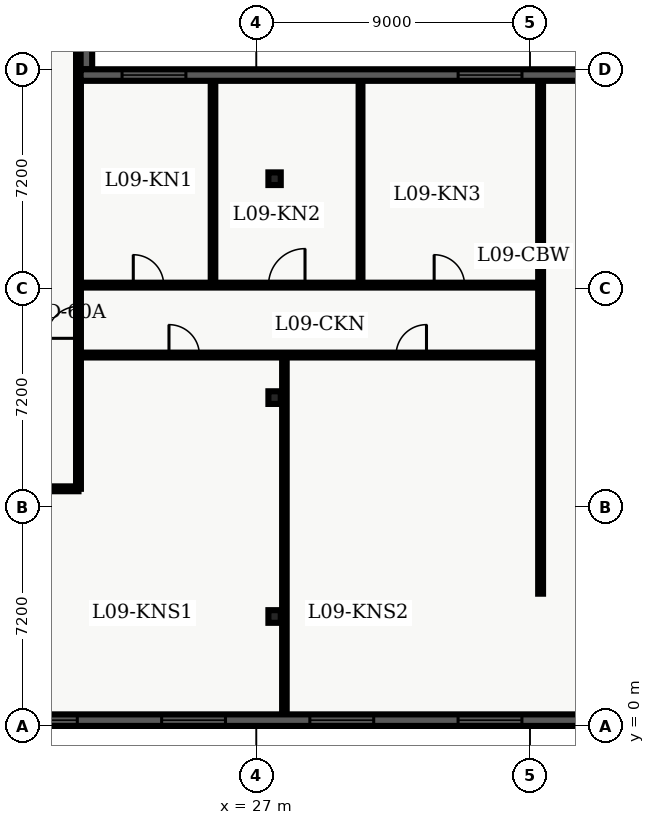
"""IFC4 building model, lengths in metres.
Left out: names, types, materials, properties, quantities, classifications, styles, units other than length and angle.
Written with IfcOpenShell. Run it as: python <this file> out.ifc"""

import sys

from ifc_helpers import new_model, entity, si_unit, converted_unit, direction, frame, origin_with_axes, origin_2d_with_axis, place, context, subcontext, project, spatial, polyline, rectangle, i_section, outline, extrude, element, fill, save


model = new_model("IFC4")
c1 = context("Model", 3, precision=1e-05, world=origin_with_axes(), true_north=direction((0.0, 1.0)))
c2 = subcontext(c1, "Body", "Model", "MODEL_VIEW")
j1 = project(units=[si_unit("LENGTHUNIT", "METRE"), converted_unit("PLANEANGLEUNIT", "DEGREE", entity("IfcPlaneAngleMeasure", 0.017), si_unit("PLANEANGLEUNIT", "RADIAN"), dimensions=[0, 0, 0, 0, 0, 0, 0])], contexts=[c1])
p1 = place(None, origin_with_axes())
s1 = spatial("IfcSite", under=j1, at=p1, CompositionType="ELEMENT")
p2 = place(p1, origin_with_axes())
s2 = spatial("IfcBuilding", under=s1, at=p2, CompositionType="ELEMENT")
p3 = place(p2, frame((0.0, 0.0, 40.5), z_axis=(0.0, 0.0, 1.0), x_axis=(1.0, 0.0, 0.0)))
s3 = spatial("IfcBuildingStorey", under=s2, at=p3, CompositionType="ELEMENT", Elevation=40.5)
for number, where, z_axis, x_axis in (
    (1, (27.6, 3.6, 0.0), (0.0, 0.0, 1.0), (1.0, 0.0, 0.0)),
    (2, (27.6, 10.8, 0.0), (0.0, 0.0, 1.0), (1.0, 0.0, 0.0)),
    (3, (27.6, 18.0, 0.0), (0.0, 0.0, 1.0), (1.0, 0.0, 0.0)),
):
    element("IfcColumn", number, at=place(p3, frame(where, z_axis=z_axis, x_axis=x_axis)), inside=s3, PredefinedType="COLUMN", context=c2, shape_type="SweptSolid", body=[
        extrude(i_section(OverallWidth=0.406, OverallDepth=0.416, WebThickness=0.03, FlangeThickness=0.048, FilletRadius=0.022, at=origin_2d_with_axis()), origin_with_axes(), (0.0, 0.0, 1.0), 3.9),
    ])
p4 = place(p3, frame((2.6, 7.8, 0.0), z_axis=(0.0, 0.0, 1.0), x_axis=(1.0, 0.0, 0.0)))
e4 = element("IfcWall", 4, at=p4, inside=s3, PredefinedType="PARTITIONING", context=c2, shape_type="SweptSolid", body=[
    extrude(outline(polyline([(0.0, -0.08), (18.55, -0.08), (18.55, 0.08), (0.0, 0.08), (0.0, -0.08)])), origin_with_axes(), (0.0, 0.0, 1.0), 2.7),
])
p5 = place(p4, frame((2.225, 0.0, 0.0), z_axis=(0.0, 0.0, 1.0), x_axis=(1.0, 0.0, 0.0)))
e5 = element("IfcOpeningElement", 5, at=p5, cuts=e4, PredefinedType="OPENING", context=c2, shape_type="SweptSolid", body=[
    extrude(rectangle(XDim=1.0, YDim=0.18, at=origin_2d_with_axis()), origin_with_axes(), (0.0, 0.0, 1.0), 2.15),
])
p6 = place(p4, frame((8.043, 0.0, 0.0), z_axis=(0.0, 0.0, 1.0), x_axis=(1.0, 0.0, 0.0)))
e6 = element("IfcOpeningElement", 6, at=p6, cuts=e4, PredefinedType="OPENING", context=c2, shape_type="SweptSolid", body=[
    extrude(rectangle(XDim=1.0, YDim=0.18, at=origin_2d_with_axis()), origin_with_axes(), (0.0, 0.0, 1.0), 2.15),
])
p7 = place(p4, frame((14.784, 0.0, 0.0), z_axis=(0.0, 0.0, 1.0), x_axis=(1.0, 0.0, 0.0)))
e7 = element("IfcOpeningElement", 7, at=p7, cuts=e4, PredefinedType="OPENING", context=c2, shape_type="SweptSolid", body=[
    extrude(rectangle(XDim=1.0, YDim=0.18, at=origin_2d_with_axis()), origin_with_axes(), (0.0, 0.0, 1.0), 2.15),
])
p8 = place(p3, frame((21.15, 7.8, 0.0), z_axis=(0.0, 0.0, 1.0), x_axis=(0.0, 1.0, 0.0)))
e8 = element("IfcWall", 8, at=p8, inside=s3, PredefinedType="PARTITIONING", context=c2, shape_type="SweptSolid", body=[
    extrude(outline(polyline([(0.0, -0.08), (32.7, -0.08), (32.7, 0.08), (0.0, 0.08), (0.0, -0.08)])), origin_with_axes(), (0.0, 0.0, 1.0), 2.7),
])
p9 = place(p8, frame((5.475, 0.0, 0.0), z_axis=(0.0, 0.0, 1.0), x_axis=(1.0, 0.0, 0.0)))
e9 = element("IfcOpeningElement", 9, at=p9, cuts=e8, PredefinedType="OPENING", context=c2, shape_type="SweptSolid", body=[
    extrude(rectangle(XDim=1.05, YDim=0.18, at=origin_2d_with_axis()), origin_with_axes(), (0.0, 0.0, 1.0), 2.15),
])
p10 = place(p3, frame((21.15, 12.2, 0.0), z_axis=(0.0, 0.0, 1.0), x_axis=(1.0, 0.0, 0.0)))
e10 = element("IfcWall", 10, at=p10, inside=s3, PredefinedType="PARTITIONING", context=c2, shape_type="SweptSolid", body=[
    extrude(outline(polyline([(0.0, -0.08), (15.2, -0.08), (15.2, 0.08), (0.0, 0.08), (0.0, -0.08)])), origin_with_axes(), (0.0, 0.0, 1.0), 2.7),
])
p11 = place(p10, frame((3.477, 0.0, 0.0), z_axis=(0.0, 0.0, 1.0), x_axis=(1.0, 0.0, 0.0)))
e11 = element("IfcOpeningElement", 11, at=p11, cuts=e10, PredefinedType="OPENING", context=c2, shape_type="SweptSolid", body=[
    extrude(rectangle(XDim=1.0, YDim=0.18, at=origin_2d_with_axis()), origin_with_axes(), (0.0, 0.0, 1.0), 2.15),
])
p12 = place(p10, frame((10.947, 0.0, 0.0), z_axis=(0.0, 0.0, 1.0), x_axis=(1.0, 0.0, 0.0)))
e12 = element("IfcOpeningElement", 12, at=p12, cuts=e10, PredefinedType="OPENING", context=c2, shape_type="SweptSolid", body=[
    extrude(rectangle(XDim=1.0, YDim=0.18, at=origin_2d_with_axis()), origin_with_axes(), (0.0, 0.0, 1.0), 2.15),
])
p13 = place(p3, frame((21.15, 14.5, 0.0), z_axis=(0.0, 0.0, 1.0), x_axis=(1.0, 0.0, 0.0)))
e13 = element("IfcWall", 13, at=p13, inside=s3, PredefinedType="PARTITIONING", context=c2, shape_type="SweptSolid", body=[
    extrude(outline(polyline([(0.0, -0.08), (15.2, -0.08), (15.2, 0.08), (0.0, 0.08), (0.0, -0.08)])), origin_with_axes(), (0.0, 0.0, 1.0), 2.7),
])
p14 = place(p13, frame((2.303, 0.0, 0.0), z_axis=(0.0, 0.0, 1.0), x_axis=(1.0, 0.0, 0.0)))
e14 = element("IfcOpeningElement", 14, at=p14, cuts=e13, PredefinedType="OPENING", context=c2, shape_type="SweptSolid", body=[
    extrude(rectangle(XDim=1.0, YDim=0.18, at=origin_2d_with_axis()), origin_with_axes(), (0.0, 0.0, 1.0), 2.15),
])
p15 = place(p13, frame((6.851, 0.0, 0.0), z_axis=(0.0, 0.0, 1.0), x_axis=(1.0, 0.0, 0.0)))
e15 = element("IfcOpeningElement", 15, at=p15, cuts=e13, PredefinedType="OPENING", context=c2, shape_type="SweptSolid", body=[
    extrude(rectangle(XDim=1.2, YDim=0.18, at=origin_2d_with_axis()), origin_with_axes(), (0.0, 0.0, 1.0), 2.2),
])
p16 = place(p13, frame((12.198, 0.0, 0.0), z_axis=(0.0, 0.0, 1.0), x_axis=(1.0, 0.0, 0.0)))
e16 = element("IfcOpeningElement", 16, at=p16, cuts=e13, PredefinedType="OPENING", context=c2, shape_type="SweptSolid", body=[
    extrude(rectangle(XDim=1.0, YDim=0.18, at=origin_2d_with_axis()), origin_with_axes(), (0.0, 0.0, 1.0), 2.15),
])
p17 = place(p3, frame((36.35, 4.35, 0.0), z_axis=(0.0, 0.0, 1.0), x_axis=(0.0, 1.0, 0.0)))
e17 = element("IfcWall", 17, at=p17, inside=s3, PredefinedType="PARTITIONING", context=c2, shape_type="SweptSolid", body=[
    extrude(outline(polyline([(0.0, -0.08), (16.95, -0.08), (16.95, 0.08), (0.0, 0.08), (0.0, -0.08)])), origin_with_axes(), (0.0, 0.0, 1.0), 2.7),
])
p18 = place(p3, frame((27.923, 0.36, 0.0), z_axis=(0.0, 0.0, 1.0), x_axis=(0.0, 1.0, 0.0)))
e18 = element("IfcWall", 18, at=p18, inside=s3, PredefinedType="PARTITIONING", context=c2, shape_type="SweptSolid", body=[
    extrude(outline(polyline([(0.0, -0.075), (11.72, -0.075), (11.72, 0.075), (0.0, 0.075), (0.0, -0.075)])), origin_with_axes(), (0.0, 0.0, 1.0), 2.7),
])
p19 = place(p3, frame((25.575, 14.62, 0.0), z_axis=(0.0, 0.0, 1.0), x_axis=(0.0, 1.0, 0.0)))
e19 = element("IfcWall", 19, at=p19, inside=s3, PredefinedType="PARTITIONING", context=c2, shape_type="SweptSolid", body=[
    extrude(outline(polyline([(0.0, -0.075), (6.605, -0.075), (6.605, 0.075), (0.0, 0.075), (0.0, -0.075)])), origin_with_axes(), (0.0, 0.0, 1.0), 2.7),
])
p20 = place(p3, frame((30.427, 14.62, 0.0), z_axis=(0.0, 0.0, 1.0), x_axis=(0.0, 1.0, 0.0)))
e20 = element("IfcWall", 20, at=p20, inside=s3, PredefinedType="PARTITIONING", context=c2, shape_type="SweptSolid", body=[
    extrude(outline(polyline([(0.0, -0.062), (6.605, -0.062), (6.605, 0.062), (0.0, 0.062), (0.0, -0.062)])), origin_with_axes(), (0.0, 0.0, 1.0), 2.7),
])
p21 = place(p3, frame((57.22, 0.19, 0.0), z_axis=(0.0, 0.0, 1.0), x_axis=(-1.0, 0.0, 0.0)))
e21 = element("IfcWall", 21, at=p21, inside=s3, PredefinedType="SOLIDWALL", context=c2, shape_type="SweptSolid", body=[
    extrude(outline(polyline([(0.0, -0.19), (54.82, -0.19), (54.82, 0.19), (0.0, 0.19), (0.0, -0.19)])), origin_with_axes(), (0.0, 0.0, 1.0), 3.66),
])
p22 = place(p21, frame((3.037, 0.0, 0.45), z_axis=(0.0, 0.0, 1.0), x_axis=(1.0, 0.0, 0.0)))
e22 = element("IfcOpeningElement", 22, at=p22, cuts=e21, PredefinedType="OPENING", context=c2, shape_type="SweptSolid", body=[
    extrude(rectangle(XDim=2.1, YDim=0.4, at=origin_2d_with_axis()), origin_with_axes(), (0.0, 0.0, 1.0), 2.2),
])
p23 = place(p21, frame((7.912, 0.0, 0.45), z_axis=(0.0, 0.0, 1.0), x_axis=(1.0, 0.0, 0.0)))
e23 = element("IfcOpeningElement", 23, at=p23, cuts=e21, PredefinedType="OPENING", context=c2, shape_type="SweptSolid", body=[
    extrude(rectangle(XDim=2.1, YDim=0.4, at=origin_2d_with_axis()), origin_with_axes(), (0.0, 0.0, 1.0), 2.2),
])
p24 = place(p21, frame((12.786, 0.0, 0.45), z_axis=(0.0, 0.0, 1.0), x_axis=(1.0, 0.0, 0.0)))
e24 = element("IfcOpeningElement", 24, at=p24, cuts=e21, PredefinedType="OPENING", context=c2, shape_type="SweptSolid", body=[
    extrude(rectangle(XDim=2.1, YDim=0.4, at=origin_2d_with_axis()), origin_with_axes(), (0.0, 0.0, 1.0), 2.2),
])
p25 = place(p21, frame((17.661, 0.0, 0.45), z_axis=(0.0, 0.0, 1.0), x_axis=(1.0, 0.0, 0.0)))
e25 = element("IfcOpeningElement", 25, at=p25, cuts=e21, PredefinedType="OPENING", context=c2, shape_type="SweptSolid", body=[
    extrude(rectangle(XDim=2.1, YDim=0.4, at=origin_2d_with_axis()), origin_with_axes(), (0.0, 0.0, 1.0), 2.2),
])
p26 = place(p21, frame((22.535, 0.0, 0.45), z_axis=(0.0, 0.0, 1.0), x_axis=(1.0, 0.0, 0.0)))
e26 = element("IfcOpeningElement", 26, at=p26, cuts=e21, PredefinedType="OPENING", context=c2, shape_type="SweptSolid", body=[
    extrude(rectangle(XDim=2.1, YDim=0.4, at=origin_2d_with_axis()), origin_with_axes(), (0.0, 0.0, 1.0), 2.2),
])
p27 = place(p21, frame((27.41, 0.0, 0.45), z_axis=(0.0, 0.0, 1.0), x_axis=(1.0, 0.0, 0.0)))
e27 = element("IfcOpeningElement", 27, at=p27, cuts=e21, PredefinedType="OPENING", context=c2, shape_type="SweptSolid", body=[
    extrude(rectangle(XDim=2.1, YDim=0.4, at=origin_2d_with_axis()), origin_with_axes(), (0.0, 0.0, 1.0), 2.2),
])
p28 = place(p21, frame((32.285, 0.0, 0.45), z_axis=(0.0, 0.0, 1.0), x_axis=(1.0, 0.0, 0.0)))
e28 = element("IfcOpeningElement", 28, at=p28, cuts=e21, PredefinedType="OPENING", context=c2, shape_type="SweptSolid", body=[
    extrude(rectangle(XDim=2.1, YDim=0.4, at=origin_2d_with_axis()), origin_with_axes(), (0.0, 0.0, 1.0), 2.2),
])
p29 = place(p21, frame((37.159, 0.0, 0.45), z_axis=(0.0, 0.0, 1.0), x_axis=(1.0, 0.0, 0.0)))
e29 = element("IfcOpeningElement", 29, at=p29, cuts=e21, PredefinedType="OPENING", context=c2, shape_type="SweptSolid", body=[
    extrude(rectangle(XDim=2.1, YDim=0.4, at=origin_2d_with_axis()), origin_with_axes(), (0.0, 0.0, 1.0), 2.2),
])
p30 = place(p21, frame((41.584, 0.0, 0.45), z_axis=(0.0, 0.0, 1.0), x_axis=(1.0, 0.0, 0.0)))
e30 = element("IfcOpeningElement", 30, at=p30, cuts=e21, PredefinedType="OPENING", context=c2, shape_type="SweptSolid", body=[
    extrude(rectangle(XDim=2.1, YDim=0.4, at=origin_2d_with_axis()), origin_with_axes(), (0.0, 0.0, 1.0), 2.2),
])
p31 = place(p21, frame((46.908, 0.0, 0.45), z_axis=(0.0, 0.0, 1.0), x_axis=(1.0, 0.0, 0.0)))
e31 = element("IfcOpeningElement", 31, at=p31, cuts=e21, PredefinedType="OPENING", context=c2, shape_type="SweptSolid", body=[
    extrude(rectangle(XDim=2.1, YDim=0.4, at=origin_2d_with_axis()), origin_with_axes(), (0.0, 0.0, 1.0), 2.2),
])
p32 = place(p21, frame((51.783, 0.0, 0.45), z_axis=(0.0, 0.0, 1.0), x_axis=(1.0, 0.0, 0.0)))
e32 = element("IfcOpeningElement", 32, at=p32, cuts=e21, PredefinedType="OPENING", context=c2, shape_type="SweptSolid", body=[
    extrude(rectangle(XDim=2.1, YDim=0.4, at=origin_2d_with_axis()), origin_with_axes(), (0.0, 0.0, 1.0), 2.2),
])
p33 = place(p3, frame((21.41, 45.82, 0.0), z_axis=(0.0, 0.0, 1.0), x_axis=(0.0, -1.0, 0.0)))
e33 = element("IfcWall", 33, at=p33, inside=s3, PredefinedType="SOLIDWALL", context=c2, shape_type="SweptSolid", body=[
    extrude(outline(polyline([(0.0, -0.19), (24.22, -0.19), (24.22, 0.19), (0.0, 0.19), (0.0, -0.19)])), origin_with_axes(), (0.0, 0.0, 1.0), 3.66),
])
p34 = place(p33, frame((2.902, 0.0, 0.45), z_axis=(0.0, 0.0, 1.0), x_axis=(1.0, 0.0, 0.0)))
e34 = element("IfcOpeningElement", 34, at=p34, cuts=e33, PredefinedType="OPENING", context=c2, shape_type="SweptSolid", body=[
    extrude(rectangle(XDim=2.1, YDim=0.4, at=origin_2d_with_axis()), origin_with_axes(), (0.0, 0.0, 1.0), 2.2),
])
p35 = place(p3, frame((21.22, 21.41, 0.0), z_axis=(0.0, 0.0, 1.0), x_axis=(1.0, 0.0, 0.0)))
e35 = element("IfcWall", 35, at=p35, inside=s3, PredefinedType="SOLIDWALL", context=c2, shape_type="SweptSolid", body=[
    extrude(outline(polyline([(0.0, -0.19), (17.18, -0.19), (17.18, 0.19), (0.0, 0.19), (0.0, -0.19)])), origin_with_axes(), (0.0, 0.0, 1.0), 3.66),
])
p36 = place(p35, frame((2.413, 0.0, 0.45), z_axis=(0.0, 0.0, 1.0), x_axis=(1.0, 0.0, 0.0)))
e36 = element("IfcOpeningElement", 36, at=p36, cuts=e35, PredefinedType="OPENING", context=c2, shape_type="SweptSolid", body=[
    extrude(rectangle(XDim=2.1, YDim=0.4, at=origin_2d_with_axis()), origin_with_axes(), (0.0, 0.0, 1.0), 2.2),
])
p37 = place(p35, frame((13.467, 0.0, 0.45), z_axis=(0.0, 0.0, 1.0), x_axis=(1.0, 0.0, 0.0)))
e37 = element("IfcOpeningElement", 37, at=p37, cuts=e35, PredefinedType="OPENING", context=c2, shape_type="SweptSolid", body=[
    extrude(rectangle(XDim=2.1, YDim=0.4, at=origin_2d_with_axis()), origin_with_axes(), (0.0, 0.0, 1.0), 2.2),
])
p38 = place(p8, frame((5.475, 0.0, 0.0), z_axis=(0.0, 0.0, 1.0), x_axis=(1.0, 0.0, 0.0)))
e38 = element("IfcDoor", 38, at=p38, inside=s3, OperationType="SINGLE_SWING_LEFT", PredefinedType="DOOR", context=c2, shape_type="SweptSolid", body=[
    extrude(rectangle(XDim=1.05, YDim=0.09, at=origin_2d_with_axis()), origin_with_axes(), (0.0, 0.0, 1.0), 2.15),
])
fill(e9, e38)
p39 = place(p10, frame((3.477, 0.0, 0.0), z_axis=(0.0, 0.0, 1.0), x_axis=(1.0, 0.0, 0.0)))
e39 = element("IfcDoor", 39, at=p39, inside=s3, OperationType="SINGLE_SWING_LEFT", PredefinedType="DOOR", context=c2, shape_type="SweptSolid", body=[
    extrude(rectangle(XDim=1.0, YDim=0.09, at=origin_2d_with_axis()), origin_with_axes(), (0.0, 0.0, 1.0), 2.15),
])
fill(e11, e39)
p40 = place(p10, frame((10.947, 0.0, 0.0), z_axis=(0.0, 0.0, 1.0), x_axis=(1.0, 0.0, 0.0)))
e40 = element("IfcDoor", 40, at=p40, inside=s3, OperationType="SINGLE_SWING_RIGHT", PredefinedType="DOOR", context=c2, shape_type="SweptSolid", body=[
    extrude(rectangle(XDim=1.0, YDim=0.09, at=origin_2d_with_axis()), origin_with_axes(), (0.0, 0.0, 1.0), 2.15),
])
fill(e12, e40)
p41 = place(p13, frame((2.303, 0.0, 0.0), z_axis=(0.0, 0.0, 1.0), x_axis=(1.0, 0.0, 0.0)))
e41 = element("IfcDoor", 41, at=p41, inside=s3, OperationType="SINGLE_SWING_LEFT", PredefinedType="DOOR", context=c2, shape_type="SweptSolid", body=[
    extrude(rectangle(XDim=1.0, YDim=0.09, at=origin_2d_with_axis()), origin_with_axes(), (0.0, 0.0, 1.0), 2.15),
])
fill(e14, e41)
p42 = place(p13, frame((6.851, 0.0, 0.0), z_axis=(0.0, 0.0, 1.0), x_axis=(1.0, 0.0, 0.0)))
e42 = element("IfcDoor", 42, at=p42, inside=s3, OperationType="SINGLE_SWING_RIGHT", PredefinedType="DOOR", context=c2, shape_type="SweptSolid", body=[
    extrude(rectangle(XDim=1.2, YDim=0.09, at=origin_2d_with_axis()), origin_with_axes(), (0.0, 0.0, 1.0), 2.2),
])
fill(e15, e42)
p43 = place(p13, frame((12.198, 0.0, 0.0), z_axis=(0.0, 0.0, 1.0), x_axis=(1.0, 0.0, 0.0)))
e43 = element("IfcDoor", 43, at=p43, inside=s3, OperationType="SINGLE_SWING_LEFT", PredefinedType="DOOR", context=c2, shape_type="SweptSolid", body=[
    extrude(rectangle(XDim=1.0, YDim=0.09, at=origin_2d_with_axis()), origin_with_axes(), (0.0, 0.0, 1.0), 2.15),
])
fill(e16, e43)
p44 = place(p21, frame((22.535, 0.0, 0.45), z_axis=(0.0, 0.0, 1.0), x_axis=(1.0, 0.0, 0.0)))
e44 = element("IfcWindow", 44, at=p44, inside=s3, PredefinedType="WINDOW", context=c2, shape_type="SweptSolid", body=[
    extrude(rectangle(XDim=2.1, YDim=0.09, at=origin_2d_with_axis()), origin_with_axes(), (0.0, 0.0, 1.0), 2.2),
])
fill(e26, e44)
p45 = place(p21, frame((27.41, 0.0, 0.45), z_axis=(0.0, 0.0, 1.0), x_axis=(1.0, 0.0, 0.0)))
e45 = element("IfcWindow", 45, at=p45, inside=s3, PredefinedType="WINDOW", context=c2, shape_type="SweptSolid", body=[
    extrude(rectangle(XDim=2.1, YDim=0.09, at=origin_2d_with_axis()), origin_with_axes(), (0.0, 0.0, 1.0), 2.2),
])
fill(e27, e45)
p46 = place(p21, frame((32.285, 0.0, 0.45), z_axis=(0.0, 0.0, 1.0), x_axis=(1.0, 0.0, 0.0)))
e46 = element("IfcWindow", 46, at=p46, inside=s3, PredefinedType="WINDOW", context=c2, shape_type="SweptSolid", body=[
    extrude(rectangle(XDim=2.1, YDim=0.09, at=origin_2d_with_axis()), origin_with_axes(), (0.0, 0.0, 1.0), 2.2),
])
fill(e28, e46)
p47 = place(p21, frame((37.159, 0.0, 0.45), z_axis=(0.0, 0.0, 1.0), x_axis=(1.0, 0.0, 0.0)))
e47 = element("IfcWindow", 47, at=p47, inside=s3, PredefinedType="WINDOW", context=c2, shape_type="SweptSolid", body=[
    extrude(rectangle(XDim=2.1, YDim=0.09, at=origin_2d_with_axis()), origin_with_axes(), (0.0, 0.0, 1.0), 2.2),
])
fill(e29, e47)
p48 = place(p35, frame((2.413, 0.0, 0.45), z_axis=(0.0, 0.0, 1.0), x_axis=(1.0, 0.0, 0.0)))
e48 = element("IfcWindow", 48, at=p48, inside=s3, PredefinedType="WINDOW", context=c2, shape_type="SweptSolid", body=[
    extrude(rectangle(XDim=2.1, YDim=0.09, at=origin_2d_with_axis()), origin_with_axes(), (0.0, 0.0, 1.0), 2.2),
])
fill(e36, e48)
p49 = place(p35, frame((13.467, 0.0, 0.45), z_axis=(0.0, 0.0, 1.0), x_axis=(1.0, 0.0, 0.0)))
e49 = element("IfcWindow", 49, at=p49, inside=s3, PredefinedType="WINDOW", context=c2, shape_type="SweptSolid", body=[
    extrude(rectangle(XDim=2.1, YDim=0.09, at=origin_2d_with_axis()), origin_with_axes(), (0.0, 0.0, 1.0), 2.2),
])
fill(e37, e49)
save(model, sys.argv[1])
